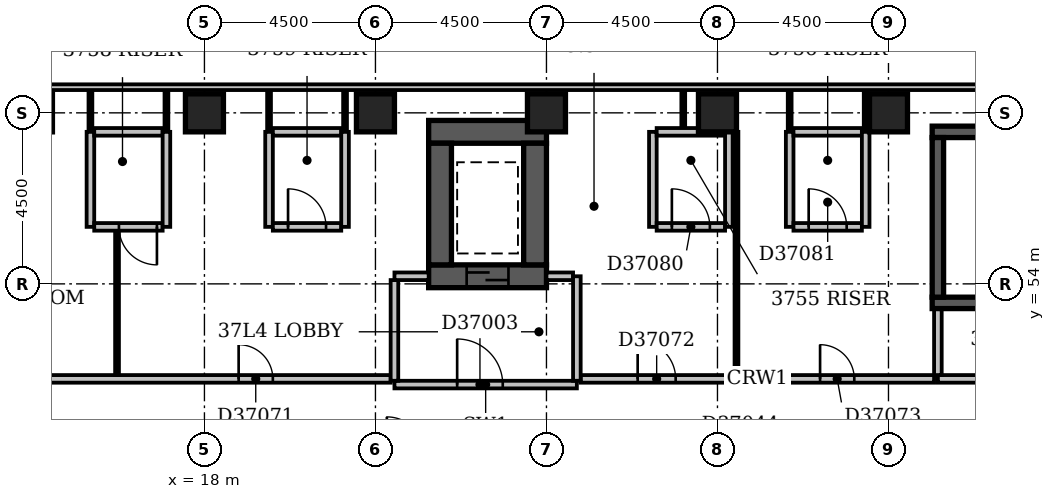
"""IFC4 building model, lengths in metres.
Left out: names, types, materials, properties, quantities, classifications, styles, units other than length and angle.
Written with IfcOpenShell. Run it as: python <this file> out.ifc"""

import sys

from ifc_helpers import new_model, si_unit, direction, frame, frame_2d, origin, origin_2d, place, context, subcontext, project, spatial, rectangle, extrude, element, fill, save


model = new_model("IFC4")
c1 = context("Model", 3, precision=1e-05, world=origin(), true_north=direction((0.0, 1.0)))
c2 = subcontext(c1, "Body", "Model", "MODEL_VIEW")
j1 = project(units=[si_unit("LENGTHUNIT", "METRE"), si_unit("PLANEANGLEUNIT", "RADIAN")], contexts=[c1])
p1 = place(None, origin())
s1 = spatial("IfcSite", under=j1, at=p1, CompositionType="ELEMENT")
p2 = place(p1, origin())
s2 = spatial("IfcBuilding", under=s1, at=p2, CompositionType="ELEMENT")
p3 = place(p2, frame((0.0, 0.0, 148.4)))
s3 = spatial("IfcBuildingStorey", under=s2, at=p3, CompositionType="ELEMENT", Elevation=148.4)
p4 = place(p3, frame((23.9, 54.2, -0.3), z_axis=(0.0, 0.0, 1.0), x_axis=(1.0, 0.0, 0.0)))
e1 = element("IfcWall", 1, at=p4, inside=s3, PredefinedType="SHEAR", context=c2, shape_type="SweptSolid", body=[
    extrude(rectangle(XDim=3.1, YDim=0.6, at=frame_2d((1.55, 0.0))), origin(), (0.0, 0.0, 1.0), 3.6),
])
p5 = place(p4, frame((1.0, 0.0, 0.3)))
e2 = element("IfcOpeningElement", 2, at=p5, cuts=e1, PredefinedType="OPENING", context=c2, shape_type="SweptSolid", body=[
    extrude(rectangle(XDim=1.1, YDim=2.1, at=frame_2d((0.55, 1.05))), frame((0.0, 0.312, 0.0), z_axis=(0.0, -1.0, 0.0), x_axis=(1.0, 0.0, 0.0)), (0.0, 0.0, 1.0), 0.624),
])
p6 = place(p3, frame((23.9, 58.0, -0.3), z_axis=(0.0, 0.0, 1.0), x_axis=(1.0, 0.0, 0.0)))
e3 = element("IfcWall", 3, at=p6, inside=s3, PredefinedType="SHEAR", context=c2, shape_type="SweptSolid", body=[
    extrude(rectangle(XDim=3.1, YDim=0.6, at=frame_2d((1.55, 0.0))), origin(), (0.0, 0.0, 1.0), 3.6),
])
for number, where, z_axis, x_axis in (
    (4, (24.2, 54.5, -0.3), (0.0, 0.0, 1.0), (0.0, 1.0, 0.0)),
    (5, (26.7, 54.5, -0.3), (0.0, 0.0, 1.0), (0.0, 1.0, 0.0)),
):
    element("IfcWall", number, at=place(p3, frame(where, z_axis=z_axis, x_axis=x_axis)), inside=s3, PredefinedType="SHEAR", context=c2, shape_type="SweptSolid", body=[
        extrude(rectangle(XDim=3.2, YDim=0.6, at=frame_2d((1.6, 0.0))), origin(), (0.0, 0.0, 1.0), 3.6),
    ])
p7 = place(p3, frame((37.15, 53.5, -0.3), z_axis=(0.0, 0.0, 1.0), x_axis=(1.0, 0.0, 0.0)))
e6 = element("IfcWall", 6, at=p7, inside=s3, PredefinedType="SHEAR", context=c2, shape_type="SweptSolid", body=[
    extrude(rectangle(XDim=7.0, YDim=0.3, at=frame_2d((3.5, 0.0))), origin(), (0.0, 0.0, 1.0), 3.6),
])
p8 = place(p7, frame((5.58, 0.0, 0.3)))
e7 = element("IfcOpeningElement", 7, at=p8, cuts=e6, PredefinedType="OPENING", context=c2, shape_type="SweptSolid", body=[
    extrude(rectangle(XDim=1.1, YDim=2.1, at=frame_2d((0.55, 1.05))), frame((0.0, 0.162, 0.0), z_axis=(0.0, -1.0, 0.0), x_axis=(1.0, 0.0, 0.0)), (0.0, 0.0, 1.0), 0.324),
])
p9 = place(p3, frame((37.15, 58.0, -0.3), z_axis=(0.0, 0.0, 1.0), x_axis=(1.0, 0.0, 0.0)))
e8 = element("IfcWall", 8, at=p9, inside=s3, PredefinedType="SHEAR", context=c2, shape_type="SweptSolid", body=[
    extrude(rectangle(XDim=7.35, YDim=0.3, at=frame_2d((3.675, 0.0))), origin(), (0.0, 0.0, 1.0), 3.6),
])
p10 = place(p3, frame((37.3, 53.65, -0.3), z_axis=(0.0, 0.0, 1.0), x_axis=(0.0, 1.0, 0.0)))
e9 = element("IfcWall", 9, at=p10, inside=s3, PredefinedType="SHEAR", context=c2, shape_type="SweptSolid", body=[
    extrude(rectangle(XDim=4.2, YDim=0.3, at=frame_2d((2.1, 0.0))), origin(), (0.0, 0.0, 1.0), 3.6),
])
for number, where, z_axis, x_axis in (
    (10, (18.0, 58.5, -0.3), (0.0, 0.0, 1.0), (1.0, 0.0, 0.0)),
    (11, (22.5, 58.5, -0.3), (0.0, 0.0, 1.0), (1.0, 0.0, 0.0)),
    (12, (27.0, 58.5, -0.3), (0.0, 0.0, 1.0), (1.0, 0.0, 0.0)),
    (13, (31.5, 58.5, -0.3), (0.0, 0.0, 1.0), (1.0, 0.0, 0.0)),
    (14, (36.0, 58.5, -0.3), (0.0, 0.0, 1.0), (1.0, 0.0, 0.0)),
):
    element("IfcColumn", number, at=place(p3, frame(where, z_axis=z_axis, x_axis=x_axis)), inside=s3, PredefinedType="COLUMN", context=c2, shape_type="SweptSolid", body=[
        extrude(rectangle(XDim=1.0, YDim=1.0, at=origin_2d()), origin(), (0.0, 0.0, 1.0), 3.6),
    ])
p11 = place(p3, frame((68.1, 59.175, 0.0), z_axis=(0.0, 0.0, 1.0), x_axis=(-1.0, 0.0, 0.0)))
e15 = element("IfcWall", 15, at=p11, inside=s3, PredefinedType="STANDARD", context=c2, shape_type="SweptSolid", body=[
    extrude(rectangle(XDim=68.85, YDim=0.15, at=frame_2d((34.425, 0.0))), origin(), (0.0, 0.0, 1.0), 2.7),
])
p12 = place(p11, frame((1.65, 0.0, 0.6)))
e16 = element("IfcOpeningElement", 16, at=p12, cuts=e15, PredefinedType="OPENING", context=c2, shape_type="SweptSolid", body=[
    extrude(rectangle(XDim=2.4, YDim=1.8, at=frame_2d((1.2, 0.9))), frame((0.0, 0.087, 0.0), z_axis=(0.0, -1.0, 0.0), x_axis=(1.0, 0.0, 0.0)), (0.0, 0.0, 1.0), 0.174),
])
p13 = place(p11, frame((7.347, 0.0, 0.6)))
e17 = element("IfcOpeningElement", 17, at=p13, cuts=e15, PredefinedType="OPENING", context=c2, shape_type="SweptSolid", body=[
    extrude(rectangle(XDim=1.5, YDim=1.8, at=frame_2d((0.75, 0.9))), frame((0.0, 0.087, 0.0), z_axis=(0.0, -1.0, 0.0), x_axis=(1.0, 0.0, 0.0)), (0.0, 0.0, 1.0), 0.174),
])
p14 = place(p11, frame((15.15, 0.0, 0.6)))
e18 = element("IfcOpeningElement", 18, at=p14, cuts=e15, PredefinedType="OPENING", context=c2, shape_type="SweptSolid", body=[
    extrude(rectangle(XDim=2.4, YDim=1.8, at=frame_2d((1.2, 0.9))), frame((0.0, 0.087, 0.0), z_axis=(0.0, -1.0, 0.0), x_axis=(1.0, 0.0, 0.0)), (0.0, 0.0, 1.0), 0.174),
])
p15 = place(p3, frame((23.0, 51.35, 0.0), z_axis=(0.0, 0.0, 1.0), x_axis=(1.0, 0.0, 0.0)))
e19 = element("IfcWall", 19, at=p15, inside=s3, PredefinedType="PARTITIONING", context=c2, shape_type="SweptSolid", body=[
    extrude(rectangle(XDim=4.8, YDim=0.2, at=frame_2d((2.4, 0.0))), origin(), (0.0, 0.0, 1.0), 3.3),
])
p16 = place(p15, frame((1.65, 0.0, 0.0)))
e20 = element("IfcOpeningElement", 20, at=p16, cuts=e19, PredefinedType="OPENING", context=c2, shape_type="SweptSolid", body=[
    extrude(rectangle(XDim=1.2, YDim=2.1, at=frame_2d((0.6, 1.05))), frame((0.0, 0.112, 0.0), z_axis=(0.0, -1.0, 0.0), x_axis=(1.0, 0.0, 0.0)), (0.0, 0.0, 1.0), 0.224),
])
p17 = place(p3, frame((27.8, 51.45, 0.0), z_axis=(0.0, 0.0, 1.0), x_axis=(0.0, 1.0, 0.0)))
e21 = element("IfcWall", 21, at=p17, inside=s3, PredefinedType="PARTITIONING", context=c2, shape_type="SweptSolid", body=[
    extrude(rectangle(XDim=2.75, YDim=0.2, at=frame_2d((1.375, 0.0))), origin(), (0.0, 0.0, 1.0), 3.3),
])
p18 = place(p3, frame((23.0, 54.2, 0.0), z_axis=(0.0, 0.0, 1.0), x_axis=(1.0, 0.0, 0.0)))
e22 = element("IfcWall", 22, at=p18, inside=s3, PredefinedType="PARTITIONING", context=c2, shape_type="SweptSolid", body=[
    extrude(rectangle(XDim=0.9, YDim=0.2, at=frame_2d((0.45, 0.0))), origin(), (0.0, 0.0, 1.0), 3.3),
])
p19 = place(p3, frame((27.0, 54.2, 0.0), z_axis=(0.0, 0.0, 1.0), x_axis=(1.0, 0.0, 0.0)))
e23 = element("IfcWall", 23, at=p19, inside=s3, PredefinedType="PARTITIONING", context=c2, shape_type="SweptSolid", body=[
    extrude(rectangle(XDim=0.7, YDim=0.2, at=frame_2d((0.35, 0.0))), origin(), (0.0, 0.0, 1.0), 3.3),
])
p20 = place(p3, frame((23.0, 51.45, 0.0), z_axis=(0.0, 0.0, 1.0), x_axis=(0.0, 1.0, 0.0)))
e24 = element("IfcWall", 24, at=p20, inside=s3, PredefinedType="PARTITIONING", context=c2, shape_type="SweptSolid", body=[
    extrude(rectangle(XDim=2.65, YDim=0.2, at=frame_2d((1.325, 0.0))), origin(), (0.0, 0.0, 1.0), 3.3),
])
p21 = place(p3, frame((37.3, 51.5, 0.0), z_axis=(0.0, 0.0, 1.0), x_axis=(1.0, 0.0, 0.0)))
e25 = element("IfcWall", 25, at=p21, inside=s3, PredefinedType="PARTITIONING", context=c2, shape_type="SweptSolid", body=[
    extrude(rectangle(XDim=6.7, YDim=0.2, at=frame_2d((3.35, 0.0))), origin(), (0.0, 0.0, 1.0), 3.3),
])
p22 = place(p21, frame((2.75, 0.0, 0.0)))
e26 = element("IfcOpeningElement", 26, at=p22, cuts=e25, PredefinedType="OPENING", context=c2, shape_type="SweptSolid", body=[
    extrude(rectangle(XDim=1.2, YDim=2.1, at=frame_2d((0.6, 1.05))), frame((0.0, 0.112, 0.0), z_axis=(0.0, -1.0, 0.0), x_axis=(1.0, 0.0, 0.0)), (0.0, 0.0, 1.0), 0.224),
])
p23 = place(p3, frame((37.3, 51.6, 0.0), z_axis=(0.0, 0.0, 1.0), x_axis=(0.0, 1.0, 0.0)))
e27 = element("IfcWall", 27, at=p23, inside=s3, PredefinedType="PARTITIONING", context=c2, shape_type="SweptSolid", body=[
    extrude(rectangle(XDim=1.73, YDim=0.2, at=frame_2d((0.865, 0.0))), origin(), (0.0, 0.0, 1.0), 3.3),
])
p24 = place(p3, frame((7.6, 51.5, 0.0), z_axis=(0.0, 0.0, 1.0), x_axis=(1.0, 0.0, 0.0)))
e28 = element("IfcWall", 28, at=p24, inside=s3, PredefinedType="PARTITIONING", context=c2, shape_type="SweptSolid", body=[
    extrude(rectangle(XDim=15.3, YDim=0.2, at=frame_2d((7.65, 0.0))), origin(), (0.0, 0.0, 1.0), 3.3),
])
p25 = place(p24, frame((3.55, 0.0, 0.0)))
e29 = element("IfcOpeningElement", 29, at=p25, cuts=e28, PredefinedType="OPENING", context=c2, shape_type="SweptSolid", body=[
    extrude(rectangle(XDim=0.9, YDim=2.1, at=frame_2d((0.45, 1.05))), frame((0.0, 0.112, 0.0), z_axis=(0.0, -1.0, 0.0), x_axis=(1.0, 0.0, 0.0)), (0.0, 0.0, 1.0), 0.224),
])
p26 = place(p24, frame((11.3, 0.0, 0.0)))
e30 = element("IfcOpeningElement", 30, at=p26, cuts=e28, PredefinedType="OPENING", context=c2, shape_type="SweptSolid", body=[
    extrude(rectangle(XDim=0.9, YDim=2.1, at=frame_2d((0.45, 1.05))), frame((0.0, 0.112, 0.0), z_axis=(0.0, -1.0, 0.0), x_axis=(1.0, 0.0, 0.0)), (0.0, 0.0, 1.0), 0.224),
])
p27 = place(p3, frame((27.9, 51.5, 0.0), z_axis=(0.0, 0.0, 1.0), x_axis=(1.0, 0.0, 0.0)))
e31 = element("IfcWall", 31, at=p27, inside=s3, PredefinedType="PARTITIONING", context=c2, shape_type="SweptSolid", body=[
    extrude(rectangle(XDim=9.3, YDim=0.2, at=frame_2d((4.65, 0.0))), origin(), (0.0, 0.0, 1.0), 3.3),
])
p28 = place(p27, frame((1.5, 0.0, 0.0)))
e32 = element("IfcOpeningElement", 32, at=p28, cuts=e31, PredefinedType="OPENING", context=c2, shape_type="SweptSolid", body=[
    extrude(rectangle(XDim=1.0, YDim=2.1, at=frame_2d((0.5, 1.05))), frame((0.0, 0.112, 0.0), z_axis=(0.0, -1.0, 0.0), x_axis=(1.0, 0.0, 0.0)), (0.0, 0.0, 1.0), 0.224),
])
p29 = place(p27, frame((6.3, 0.0, 0.0)))
e33 = element("IfcOpeningElement", 33, at=p29, cuts=e31, PredefinedType="OPENING", context=c2, shape_type="SweptSolid", body=[
    extrude(rectangle(XDim=0.9, YDim=2.1, at=frame_2d((0.45, 1.05))), frame((0.0, 0.112, 0.0), z_axis=(0.0, -1.0, 0.0), x_axis=(1.0, 0.0, 0.0)), (0.0, 0.0, 1.0), 0.224),
])
p30 = place(p3, frame((15.7, 51.6, 0.0), z_axis=(0.0, 0.0, 1.0), x_axis=(0.0, 1.0, 0.0)))
e34 = element("IfcWall", 34, at=p30, inside=s3, PredefinedType="PARTITIONING", context=c2, shape_type="SweptSolid", body=[
    extrude(rectangle(XDim=3.8, YDim=0.1, at=frame_2d((1.9, 0.0))), origin(), (0.0, 0.0, 1.0), 3.3),
])
p31 = place(p3, frame((32.0, 51.6, 0.0), z_axis=(0.0, 0.0, 1.0), x_axis=(0.0, 1.0, 0.0)))
e35 = element("IfcWall", 35, at=p31, inside=s3, PredefinedType="PARTITIONING", context=c2, shape_type="SweptSolid", body=[
    extrude(rectangle(XDim=6.4, YDim=0.1, at=frame_2d((3.2, 0.0))), origin(), (0.0, 0.0, 1.0), 3.3),
])
p32 = place(p3, frame((15.0, 55.5, 0.0), z_axis=(0.0, 0.0, 1.0), x_axis=(0.0, 1.0, 0.0)))
e36 = element("IfcWall", 36, at=p32, inside=s3, PredefinedType="PARTITIONING", context=c2, shape_type="SweptSolid", body=[
    extrude(rectangle(XDim=2.5, YDim=0.2, at=frame_2d((1.25, 0.0))), origin(), (0.0, 0.0, 1.0), 3.3),
])
p33 = place(p3, frame((15.1, 55.5, 0.0), z_axis=(0.0, 0.0, 1.0), x_axis=(1.0, 0.0, 0.0)))
e37 = element("IfcWall", 37, at=p33, inside=s3, PredefinedType="PARTITIONING", context=c2, shape_type="SweptSolid", body=[
    extrude(rectangle(XDim=1.8, YDim=0.2, at=frame_2d((0.9, 0.0))), origin(), (0.0, 0.0, 1.0), 3.3),
])
p34 = place(p33, frame((0.65, 0.0, 0.0)))
e38 = element("IfcOpeningElement", 38, at=p34, cuts=e37, PredefinedType="OPENING", context=c2, shape_type="SweptSolid", body=[
    extrude(rectangle(XDim=1.0, YDim=2.1, at=frame_2d((0.5, 1.05))), frame((0.0, 0.112, 0.0), z_axis=(0.0, -1.0, 0.0), x_axis=(1.0, 0.0, 0.0)), (0.0, 0.0, 1.0), 0.224),
])
for number, where, z_axis, x_axis in (
    (39, (17.0, 55.5, 0.0), (0.0, 0.0, 1.0), (0.0, 1.0, 0.0)),
    (40, (19.7, 55.5, 0.0), (0.0, 0.0, 1.0), (0.0, 1.0, 0.0)),
):
    element("IfcWall", number, at=place(p3, frame(where, z_axis=z_axis, x_axis=x_axis)), inside=s3, PredefinedType="PARTITIONING", context=c2, shape_type="SweptSolid", body=[
        extrude(rectangle(XDim=2.5, YDim=0.2, at=frame_2d((1.25, 0.0))), origin(), (0.0, 0.0, 1.0), 3.3),
    ])
p35 = place(p3, frame((19.8, 55.5, 0.0), z_axis=(0.0, 0.0, 1.0), x_axis=(1.0, 0.0, 0.0)))
e41 = element("IfcWall", 41, at=p35, inside=s3, PredefinedType="PARTITIONING", context=c2, shape_type="SweptSolid", body=[
    extrude(rectangle(XDim=1.8, YDim=0.2, at=frame_2d((0.9, 0.0))), origin(), (0.0, 0.0, 1.0), 3.3),
])
p36 = place(p35, frame((0.4, 0.0, 0.0)))
e42 = element("IfcOpeningElement", 42, at=p36, cuts=e41, PredefinedType="OPENING", context=c2, shape_type="SweptSolid", body=[
    extrude(rectangle(XDim=1.0, YDim=2.1, at=frame_2d((0.5, 1.05))), frame((0.0, 0.112, 0.0), z_axis=(0.0, -1.0, 0.0), x_axis=(1.0, 0.0, 0.0)), (0.0, 0.0, 1.0), 0.224),
])
for number, where, z_axis, x_axis in (
    (43, (21.7, 55.5, 0.0), (0.0, 0.0, 1.0), (0.0, 1.0, 0.0)),
    (44, (29.8, 55.5, 0.0), (0.0, 0.0, 1.0), (0.0, 1.0, 0.0)),
):
    element("IfcWall", number, at=place(p3, frame(where, z_axis=z_axis, x_axis=x_axis)), inside=s3, PredefinedType="PARTITIONING", context=c2, shape_type="SweptSolid", body=[
        extrude(rectangle(XDim=2.5, YDim=0.2, at=frame_2d((1.25, 0.0))), origin(), (0.0, 0.0, 1.0), 3.3),
    ])
p37 = place(p3, frame((29.9, 55.5, 0.0), z_axis=(0.0, 0.0, 1.0), x_axis=(1.0, 0.0, 0.0)))
e45 = element("IfcWall", 45, at=p37, inside=s3, PredefinedType="PARTITIONING", context=c2, shape_type="SweptSolid", body=[
    extrude(rectangle(XDim=1.8, YDim=0.2, at=frame_2d((0.9, 0.0))), origin(), (0.0, 0.0, 1.0), 3.3),
])
p38 = place(p37, frame((0.4, 0.0, 0.0)))
e46 = element("IfcOpeningElement", 46, at=p38, cuts=e45, PredefinedType="OPENING", context=c2, shape_type="SweptSolid", body=[
    extrude(rectangle(XDim=1.0, YDim=2.1, at=frame_2d((0.5, 1.05))), frame((0.0, 0.112, 0.0), z_axis=(0.0, -1.0, 0.0), x_axis=(1.0, 0.0, 0.0)), (0.0, 0.0, 1.0), 0.224),
])
for number, where, z_axis, x_axis in (
    (47, (31.8, 55.5, 0.0), (0.0, 0.0, 1.0), (0.0, 1.0, 0.0)),
    (48, (33.4, 55.5, 0.0), (0.0, 0.0, 1.0), (0.0, 1.0, 0.0)),
):
    element("IfcWall", number, at=place(p3, frame(where, z_axis=z_axis, x_axis=x_axis)), inside=s3, PredefinedType="PARTITIONING", context=c2, shape_type="SweptSolid", body=[
        extrude(rectangle(XDim=2.5, YDim=0.2, at=frame_2d((1.25, 0.0))), origin(), (0.0, 0.0, 1.0), 3.3),
    ])
p39 = place(p3, frame((33.5, 55.5, 0.0), z_axis=(0.0, 0.0, 1.0), x_axis=(1.0, 0.0, 0.0)))
e49 = element("IfcWall", 49, at=p39, inside=s3, PredefinedType="PARTITIONING", context=c2, shape_type="SweptSolid", body=[
    extrude(rectangle(XDim=1.8, YDim=0.2, at=frame_2d((0.9, 0.0))), origin(), (0.0, 0.0, 1.0), 3.3),
])
p40 = place(p39, frame((0.4, 0.0, 0.0)))
e50 = element("IfcOpeningElement", 50, at=p40, cuts=e49, PredefinedType="OPENING", context=c2, shape_type="SweptSolid", body=[
    extrude(rectangle(XDim=1.0, YDim=2.1, at=frame_2d((0.5, 1.05))), frame((0.0, 0.112, 0.0), z_axis=(0.0, -1.0, 0.0), x_axis=(1.0, 0.0, 0.0)), (0.0, 0.0, 1.0), 0.224),
])
p41 = place(p3, frame((35.4, 55.5, 0.0), z_axis=(0.0, 0.0, 1.0), x_axis=(0.0, 1.0, 0.0)))
e51 = element("IfcWall", 51, at=p41, inside=s3, PredefinedType="PARTITIONING", context=c2, shape_type="SweptSolid", body=[
    extrude(rectangle(XDim=2.5, YDim=0.2, at=frame_2d((1.25, 0.0))), origin(), (0.0, 0.0, 1.0), 2.4),
])
p42 = place(p3, frame((15.0, 58.0, 0.0), z_axis=(0.0, 0.0, 1.0), x_axis=(0.0, 1.0, 0.0)))
e52 = element("IfcWall", 52, at=p42, inside=s3, PredefinedType="PARTITIONING", context=c2, shape_type="SweptSolid", body=[
    extrude(rectangle(XDim=1.1, YDim=0.1, at=frame_2d((0.55, 0.0))), origin(), (0.0, 0.0, 1.0), 3.3),
])
p43 = place(p3, frame((15.1, 58.0, 0.0), z_axis=(0.0, 0.0, 1.0), x_axis=(1.0, 0.0, 0.0)))
e53 = element("IfcWall", 53, at=p43, inside=s3, PredefinedType="PARTITIONING", context=c2, shape_type="SweptSolid", body=[
    extrude(rectangle(XDim=1.8, YDim=0.2, at=frame_2d((0.9, 0.0))), origin(), (0.0, 0.0, 1.0), 3.3),
])
for number, where, z_axis, x_axis in (
    (54, (17.0, 58.0, 0.0), (0.0, 0.0, 1.0), (0.0, 1.0, 0.0)),
    (55, (19.7, 58.0, 0.0), (0.0, 0.0, 1.0), (0.0, 1.0, 0.0)),
):
    element("IfcWall", number, at=place(p3, frame(where, z_axis=z_axis, x_axis=x_axis)), inside=s3, PredefinedType="PARTITIONING", context=c2, shape_type="SweptSolid", body=[
        extrude(rectangle(XDim=1.1, YDim=0.1, at=frame_2d((0.55, 0.0))), origin(), (0.0, 0.0, 1.0), 3.3),
    ])
p44 = place(p3, frame((19.8, 58.0, 0.0), z_axis=(0.0, 0.0, 1.0), x_axis=(1.0, 0.0, 0.0)))
e56 = element("IfcWall", 56, at=p44, inside=s3, PredefinedType="PARTITIONING", context=c2, shape_type="SweptSolid", body=[
    extrude(rectangle(XDim=1.8, YDim=0.2, at=frame_2d((0.9, 0.0))), origin(), (0.0, 0.0, 1.0), 3.3),
])
p45 = place(p3, frame((21.7, 58.0, 0.0), z_axis=(0.0, 0.0, 1.0), x_axis=(0.0, 1.0, 0.0)))
e57 = element("IfcWall", 57, at=p45, inside=s3, PredefinedType="PARTITIONING", context=c2, shape_type="SweptSolid", body=[
    extrude(rectangle(XDim=1.1, YDim=0.1, at=frame_2d((0.55, 0.0))), origin(), (0.0, 0.0, 1.0), 3.3),
])
p46 = place(p3, frame((29.9, 58.0, 0.0), z_axis=(0.0, 0.0, 1.0), x_axis=(1.0, 0.0, 0.0)))
e58 = element("IfcWall", 58, at=p46, inside=s3, PredefinedType="PARTITIONING", context=c2, shape_type="SweptSolid", body=[
    extrude(rectangle(XDim=1.8, YDim=0.2, at=frame_2d((0.9, 0.0))), origin(), (0.0, 0.0, 1.0), 3.3),
])
p47 = place(p3, frame((33.4, 58.0, 0.0), z_axis=(0.0, 0.0, 1.0), x_axis=(0.0, 1.0, 0.0)))
e59 = element("IfcWall", 59, at=p47, inside=s3, PredefinedType="PARTITIONING", context=c2, shape_type="SweptSolid", body=[
    extrude(rectangle(XDim=1.1, YDim=0.1, at=frame_2d((0.55, 0.0))), origin(), (0.0, 0.0, 1.0), 3.3),
])
p48 = place(p3, frame((33.5, 58.0, 0.0), z_axis=(0.0, 0.0, 1.0), x_axis=(1.0, 0.0, 0.0)))
e60 = element("IfcWall", 60, at=p48, inside=s3, PredefinedType="PARTITIONING", context=c2, shape_type="SweptSolid", body=[
    extrude(rectangle(XDim=1.8, YDim=0.2, at=frame_2d((0.9, 0.0))), origin(), (0.0, 0.0, 1.0), 3.3),
])
p49 = place(p3, frame((35.4, 58.0, 0.0), z_axis=(0.0, 0.0, 1.0), x_axis=(0.0, 1.0, 0.0)))
e61 = element("IfcWall", 61, at=p49, inside=s3, PredefinedType="PARTITIONING", context=c2, shape_type="SweptSolid", body=[
    extrude(rectangle(XDim=1.1, YDim=0.1, at=frame_2d((0.55, 0.0))), origin(), (0.0, 0.0, 1.0), 2.4),
])
p50 = place(p3, frame((30.6, 58.1, 0.0), z_axis=(0.0, 0.0, 1.0), x_axis=(0.0, 1.0, 0.0)))
e62 = element("IfcWall", 62, at=p50, inside=s3, PredefinedType="PARTITIONING", context=c2, shape_type="SweptSolid", body=[
    extrude(rectangle(XDim=1.0, YDim=0.1, at=frame_2d((0.5, 0.0))), origin(), (0.0, 0.0, 1.0), 3.3),
])
p51 = place(p16, origin())
e63 = element("IfcDoor", 63, at=p51, inside=s3, OperationType="SINGLE_SWING_LEFT", PredefinedType="DOOR", context=c2, shape_type="SweptSolid", body=[
    extrude(rectangle(XDim=1.2, YDim=2.1, at=frame_2d((0.6, 1.05))), frame((0.0, 0.025, 0.0), z_axis=(0.0, -1.0, 0.0), x_axis=(1.0, 0.0, 0.0)), (0.0, 0.0, 1.0), 0.05),
])
fill(e20, e63)
p52 = place(p5, origin())
e64 = element("IfcDoor", 64, at=p52, inside=s3, OperationType="SLIDING_TO_LEFT", PredefinedType="DOOR", context=c2, shape_type="SweptSolid", body=[
    extrude(rectangle(XDim=1.1, YDim=2.1, at=frame_2d((0.55, 1.05))), frame((0.0, 0.025, 0.0), z_axis=(0.0, -1.0, 0.0), x_axis=(1.0, 0.0, 0.0)), (0.0, 0.0, 1.0), 0.05),
])
fill(e2, e64)
p53 = place(p26, origin())
e65 = element("IfcDoor", 65, at=p53, inside=s3, OperationType="SINGLE_SWING_LEFT", PredefinedType="DOOR", context=c2, shape_type="SweptSolid", body=[
    extrude(rectangle(XDim=0.9, YDim=2.1, at=frame_2d((0.45, 1.05))), frame((0.0, 0.025, 0.0), z_axis=(0.0, -1.0, 0.0), x_axis=(1.0, 0.0, 0.0)), (0.0, 0.0, 1.0), 0.05),
])
fill(e30, e65)
p54 = place(p28, origin())
e66 = element("IfcDoor", 66, at=p54, inside=s3, OperationType="SINGLE_SWING_LEFT", PredefinedType="DOOR", context=c2, shape_type="SweptSolid", body=[
    extrude(rectangle(XDim=1.0, YDim=2.1, at=frame_2d((0.5, 1.05))), frame((0.0, 0.025, 0.0), z_axis=(0.0, -1.0, 0.0), x_axis=(1.0, 0.0, 0.0)), (0.0, 0.0, 1.0), 0.05),
])
fill(e32, e66)
p55 = place(p29, origin())
e67 = element("IfcDoor", 67, at=p55, inside=s3, OperationType="SINGLE_SWING_LEFT", PredefinedType="DOOR", context=c2, shape_type="SweptSolid", body=[
    extrude(rectangle(XDim=0.9, YDim=2.1, at=frame_2d((0.45, 1.05))), frame((0.0, 0.025, 0.0), z_axis=(0.0, -1.0, 0.0), x_axis=(1.0, 0.0, 0.0)), (0.0, 0.0, 1.0), 0.05),
])
fill(e33, e67)
p56 = place(p34, origin())
e68 = element("IfcDoor", 68, at=p56, inside=s3, OperationType="SINGLE_SWING_RIGHT", PredefinedType="DOOR", context=c2, shape_type="SweptSolid", body=[
    extrude(rectangle(XDim=1.0, YDim=2.1, at=frame_2d((0.5, 1.05))), frame((0.0, 0.025, 0.0), z_axis=(0.0, -1.0, 0.0), x_axis=(1.0, 0.0, 0.0)), (0.0, 0.0, 1.0), 0.05),
])
fill(e38, e68)
p57 = place(p36, origin())
e69 = element("IfcDoor", 69, at=p57, inside=s3, OperationType="SINGLE_SWING_LEFT", PredefinedType="DOOR", context=c2, shape_type="SweptSolid", body=[
    extrude(rectangle(XDim=1.0, YDim=2.1, at=frame_2d((0.5, 1.05))), frame((0.0, 0.025, 0.0), z_axis=(0.0, -1.0, 0.0), x_axis=(1.0, 0.0, 0.0)), (0.0, 0.0, 1.0), 0.05),
])
fill(e42, e69)
p58 = place(p38, origin())
e70 = element("IfcDoor", 70, at=p58, inside=s3, OperationType="SINGLE_SWING_LEFT", PredefinedType="DOOR", context=c2, shape_type="SweptSolid", body=[
    extrude(rectangle(XDim=1.0, YDim=2.1, at=frame_2d((0.5, 1.05))), frame((0.0, 0.025, 0.0), z_axis=(0.0, -1.0, 0.0), x_axis=(1.0, 0.0, 0.0)), (0.0, 0.0, 1.0), 0.05),
])
fill(e46, e70)
p59 = place(p40, origin())
e71 = element("IfcDoor", 71, at=p59, inside=s3, OperationType="SINGLE_SWING_LEFT", PredefinedType="DOOR", context=c2, shape_type="SweptSolid", body=[
    extrude(rectangle(XDim=1.0, YDim=2.1, at=frame_2d((0.5, 1.05))), frame((0.0, 0.025, 0.0), z_axis=(0.0, -1.0, 0.0), x_axis=(1.0, 0.0, 0.0)), (0.0, 0.0, 1.0), 0.05),
])
fill(e50, e71)
save(model, sys.argv[1])
